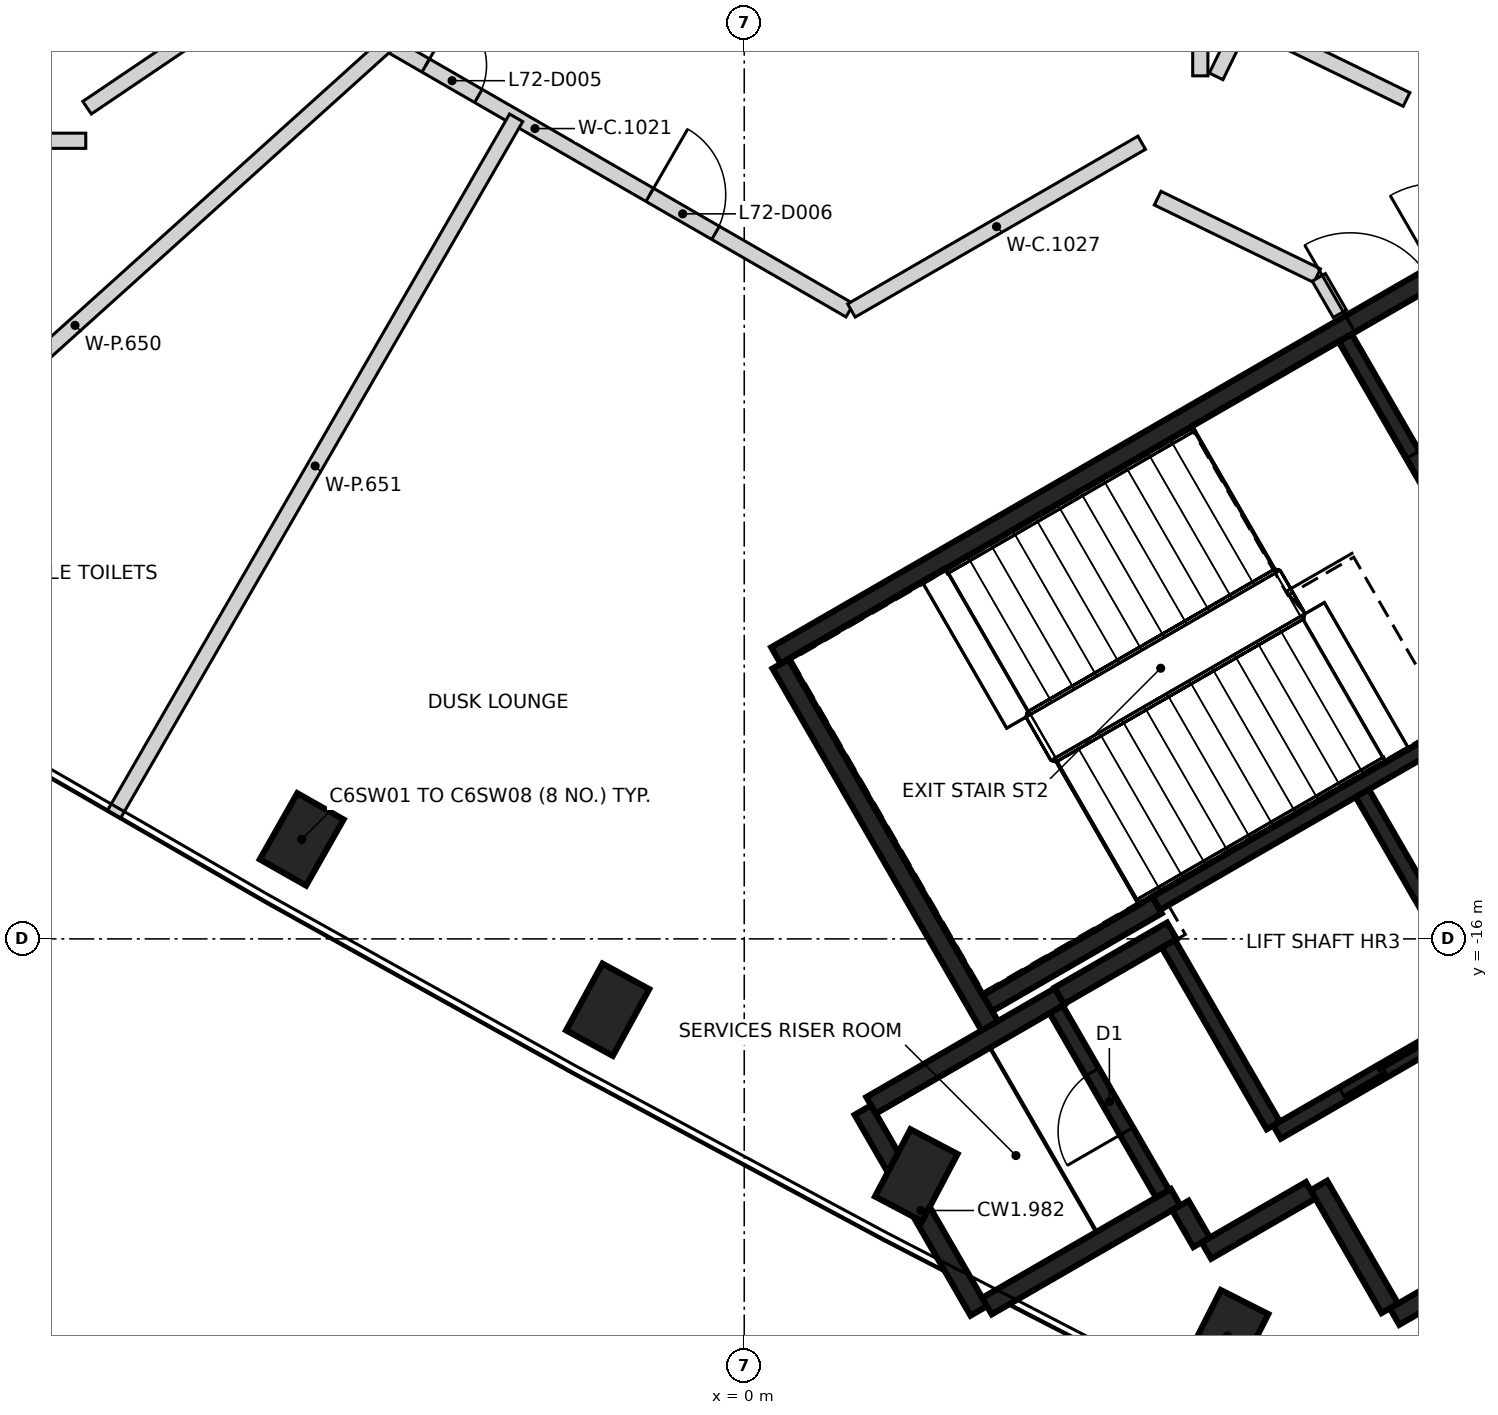
"""IFC4 building model, lengths in metres.
Left out: names, types, materials, properties, quantities, classifications, styles, units other than length and angle.
Written with IfcOpenShell. Run it as: python <this file> out.ifc"""

import sys

from ifc_helpers import new_model, si_unit, direction, frame, frame_2d, origin, origin_2d, place, context, subcontext, project, spatial, rectangle, extrude, element, fill, save


model = new_model("IFC4")
c1 = context("Model", 3, precision=1e-05, world=origin(), true_north=direction((0.0, 1.0)))
c2 = subcontext(c1, "Body", "Model", "MODEL_VIEW")
j1 = project(units=[si_unit("LENGTHUNIT", "METRE"), si_unit("PLANEANGLEUNIT", "RADIAN")], contexts=[c1])
p1 = place(None, origin())
s1 = spatial("IfcSite", under=j1, at=p1, CompositionType="ELEMENT")
p2 = place(p1, origin())
s2 = spatial("IfcBuilding", under=s1, at=p2, CompositionType="ELEMENT")
p3 = place(p2, frame((0.0, 0.0, 283.8)))
s3 = spatial("IfcBuildingStorey", under=s2, at=p3, CompositionType="ELEMENT", Elevation=283.8)
for number, where, z_axis, x_axis in (
    (1, (-5.822, -14.691, -0.35), (0.0, 0.0, 1.0), (0.493, 0.87, 0.0)),
    (2, (-1.797, -16.932, -0.35), (0.0, 0.0, 1.0), (0.479, 0.878, 0.0)),
    (3, (2.263, -19.11, -0.35), (0.0, 0.0, 1.0), (0.466, 0.885, 0.0)),
    (4, (6.356, -21.224, -0.35), (0.0, 0.0, 1.0), (0.452, 0.892, 0.0)),
):
    element("IfcColumn", number, at=place(p3, frame(where, z_axis=z_axis, x_axis=x_axis)), inside=s3, PredefinedType="COLUMN", context=c2, shape_type="SweptSolid", body=[
        extrude(rectangle(XDim=1.0, YDim=0.7, at=origin_2d()), origin(), (0.0, 0.0, 1.0), 7.2),
    ])
p4 = place(p3, frame((0.417, -12.273, 0.0), z_axis=(0.0, 0.0, 1.0), x_axis=(0.866021906294, 0.500006057782, 0.0)))
e5 = element("IfcWall", 5, at=p4, inside=s3, PredefinedType="SHEAR", context=c2, shape_type="SweptSolid", body=[
    extrude(rectangle(XDim=11.55, YDim=0.25, at=frame_2d((5.775, 0.0))), origin(), (0.0, 0.0, 1.0), 6.85),
])
p5 = place(p4, frame((10.025, 0.0, 0.0)))
e6 = element("IfcOpeningElement", 6, at=p5, cuts=e5, PredefinedType="OPENING", context=c2, shape_type="SweptSolid", body=[
    extrude(rectangle(XDim=1.2, YDim=2.1, at=frame_2d((0.6, 1.05))), frame((0.0, 0.135, 0.0), z_axis=(0.0, -1.0, 0.0), x_axis=(1.0, 0.0, 0.0)), (0.0, 0.0, 1.0), 0.27),
])
p6 = place(p4, frame((8.725, 0.0, 0.0)))
e7 = element("IfcOpeningElement", 7, at=p6, cuts=e5, PredefinedType="OPENING", context=c2, shape_type="SweptSolid", body=[
    extrude(rectangle(XDim=1.2, YDim=2.1, at=frame_2d((0.6, 1.05))), frame((0.0, 0.135, 0.0), z_axis=(0.0, -1.0, 0.0), x_axis=(1.0, 0.0, 0.0)), (0.0, 0.0, 1.0), 0.27),
])
p7 = place(p3, frame((16.133, -16.594, 0.0), z_axis=(0.0, 0.0, 1.0), x_axis=(-0.866022959057, -0.500004234368, 0.0)))
e8 = element("IfcWall", 8, at=p7, inside=s3, PredefinedType="SHEAR", context=c2, shape_type="SweptSolid", body=[
    extrude(rectangle(XDim=8.75, YDim=0.25, at=frame_2d((4.375, 0.0))), origin(), (0.0, 0.0, 1.0), 6.85),
])
p8 = place(p7, frame((3.425, 0.0, 0.0)))
e9 = element("IfcOpeningElement", 9, at=p8, cuts=e8, PredefinedType="OPENING", context=c2, shape_type="SweptSolid", body=[
    extrude(rectangle(XDim=0.9, YDim=2.1, at=frame_2d((0.45, 1.05))), frame((0.0, 0.135, 0.0), z_axis=(0.0, -1.0, 0.0), x_axis=(1.0, 0.0, 0.0)), (0.0, 0.0, 1.0), 0.27),
])
p9 = place(p3, frame((3.235, -17.153, 0.0), z_axis=(0.0, 0.0, 1.0), x_axis=(-0.500008851346, 0.866020293397, 0.0)))
e10 = element("IfcWall", 10, at=p9, inside=s3, PredefinedType="SHEAR", context=c2, shape_type="SweptSolid", body=[
    extrude(rectangle(XDim=5.51, YDim=0.25, at=frame_2d((2.755, 0.0))), origin(), (0.0, 0.0, 1.0), 6.85),
])
p10 = place(p3, frame((3.085, -20.894, 0.0), z_axis=(0.0, 0.0, 1.0), x_axis=(-0.499978833458, 0.866037623948, 0.0)))
e11 = element("IfcWall", 11, at=p10, inside=s3, PredefinedType="SHEAR", context=c2, shape_type="SweptSolid", body=[
    extrude(rectangle(XDim=3.05, YDim=0.25, at=frame_2d((1.525, 0.0))), origin(), (0.0, 0.0, 1.0), 6.85),
])
p11 = place(p3, frame((1.669, -18.19, 0.0), z_axis=(0.0, 0.0, 1.0), x_axis=(0.866042235819, 0.499970844928, 0.0)))
e12 = element("IfcWall", 12, at=p11, inside=s3, PredefinedType="SHEAR", context=c2, shape_type="SweptSolid", body=[
    extrude(rectangle(XDim=2.865, YDim=0.25, at=frame_2d((1.432, 0.0))), origin(), (0.0, 0.0, 1.0), 6.85),
])
p12 = place(p3, frame((5.675, -19.399, 0.0), z_axis=(0.0, 0.0, 1.0), x_axis=(-0.866026637627, -0.499997862916, 0.0)))
e13 = element("IfcWall", 13, at=p12, inside=s3, PredefinedType="SHEAR", context=c2, shape_type="SweptSolid", body=[
    extrude(rectangle(XDim=2.865, YDim=0.25, at=frame_2d((1.432, 0.0))), origin(), (0.0, 0.0, 1.0), 6.85),
])
p13 = place(p3, frame((5.431, -15.556, 0.0), z_axis=(0.0, 0.0, 1.0), x_axis=(-0.866022940537, -0.500004266446, 0.0)))
e14 = element("IfcWall", 14, at=p13, inside=s3, PredefinedType="SHEAR", context=c2, shape_type="SweptSolid", body=[
    extrude(rectangle(XDim=2.575, YDim=0.25, at=frame_2d((1.287, 0.0))), origin(), (0.0, 0.0, 1.0), 6.85),
])
p14 = place(p3, frame((8.493, -20.86, 0.0), z_axis=(0.0, 0.0, 1.0), x_axis=(-0.500039802285, 0.866002422705, 0.0)))
e15 = element("IfcWall", 15, at=p14, inside=s3, PredefinedType="SHEAR", context=c2, shape_type="SweptSolid", body=[
    extrude(rectangle(XDim=1.865, YDim=0.25, at=frame_2d((0.932, 0.0))), origin(), (0.0, 0.0, 1.0), 6.85),
])
p15 = place(p3, frame((4.145, -16.749, 0.0), z_axis=(0.0, 0.0, 1.0), x_axis=(0.866038183914, 0.499977863513, 0.0)))
e16 = element("IfcWall", 16, at=p15, inside=s3, PredefinedType="SHEAR", context=c2, shape_type="SweptSolid", body=[
    extrude(rectangle(XDim=1.71, YDim=0.25, at=frame_2d((0.855, 0.0))), origin(), (0.0, 0.0, 1.0), 6.85),
])
p16 = place(p3, frame((7.452, -19.308, 0.0), z_axis=(0.0, 0.0, 1.0), x_axis=(-0.866044474677, -0.49996696679, 0.0)))
e17 = element("IfcWall", 17, at=p16, inside=s3, PredefinedType="SHEAR", context=c2, shape_type="SweptSolid", body=[
    extrude(rectangle(XDim=1.584, YDim=0.25, at=frame_2d((0.792, 0.0))), origin(), (0.0, 0.0, 1.0), 6.85),
])
p17 = place(p3, frame((6.017, -19.992, 0.0), z_axis=(0.0, 0.0, 1.0), x_axis=(-0.500364886717, 0.865814633822, 0.0)))
e18 = element("IfcWall", 18, at=p17, inside=s3, PredefinedType="SHEAR", context=c2, shape_type="SweptSolid", body=[
    extrude(rectangle(XDim=0.559, YDim=0.25, at=frame_2d((0.28, 0.0))), origin(), (0.0, 0.0, 1.0), 6.85),
])
p18 = place(p3, frame((5.419, -15.534, 0.0), z_axis=(0.0, 0.0, 1.0), x_axis=(0.866029065029, 0.499993658486, 0.0)))
e19 = element("IfcWall", 19, at=p18, inside=s3, PredefinedType="SHEAR", context=c2, shape_type="SweptSolid", body=[
    extrude(rectangle(XDim=5.974, YDim=0.2, at=frame_2d((2.987, 0.0))), origin(), (0.0, 0.0, 1.0), 6.85),
])
p19 = place(p3, frame((7.01, -18.542, 0.0), z_axis=(0.0, 0.0, 1.0), x_axis=(0.866030299012, 0.499991521122, 0.0)))
e20 = element("IfcWall", 20, at=p19, inside=s3, PredefinedType="SHEAR", context=c2, shape_type="SweptSolid", body=[
    extrude(rectangle(XDim=6.1, YDim=0.2, at=frame_2d((3.05, 0.0))), origin(), (0.0, 0.0, 1.0), 6.85),
])
p20 = place(p19, frame((1.0, 0.0, 0.0)))
e21 = element("IfcOpeningElement", 21, at=p20, cuts=e20, PredefinedType="OPENING", context=c2, shape_type="SweptSolid", body=[
    extrude(rectangle(XDim=1.2, YDim=2.1, at=frame_2d((0.6, 1.05))), frame((0.0, 0.11, 0.0), z_axis=(0.0, -1.0, 0.0), x_axis=(1.0, 0.0, 0.0)), (0.0, 0.0, 1.0), 0.22),
])
p21 = place(p19, frame((3.982, 0.0, 0.0)))
e22 = element("IfcOpeningElement", 22, at=p21, cuts=e20, PredefinedType="OPENING", context=c2, shape_type="SweptSolid", body=[
    extrude(rectangle(XDim=1.2, YDim=2.1, at=frame_2d((0.6, 1.05))), frame((0.0, 0.11, 0.0), z_axis=(0.0, -1.0, 0.0), x_axis=(1.0, 0.0, 0.0)), (0.0, 0.0, 1.0), 0.22),
])
p22 = place(p3, frame((7.906, -8.094, 0.0), z_axis=(0.0, 0.0, 1.0), x_axis=(0.500027839223, -0.866009330205, 0.0)))
e23 = element("IfcWall", 23, at=p22, inside=s3, PredefinedType="SHEAR", context=c2, shape_type="SweptSolid", body=[
    extrude(rectangle(XDim=5.098, YDim=0.2, at=frame_2d((2.549, 0.0))), origin(), (0.0, 0.0, 1.0), 6.85),
])
p23 = place(p22, frame((1.774, 0.0, 0.0)))
e24 = element("IfcOpeningElement", 24, at=p23, cuts=e23, PredefinedType="OPENING", context=c2, shape_type="SweptSolid", body=[
    extrude(rectangle(XDim=1.4, YDim=2.1, at=frame_2d((0.7, 1.05))), frame((0.0, 0.11, 0.0), z_axis=(0.0, -1.0, 0.0), x_axis=(1.0, 0.0, 0.0)), (0.0, 0.0, 1.0), 0.22),
])
p24 = place(p3, frame((8.132, -14.084, 0.0), z_axis=(0.0, 0.0, 1.0), x_axis=(0.499997778408, -0.866026686418, 0.0)))
e25 = element("IfcWall", 25, at=p24, inside=s3, PredefinedType="SHEAR", context=c2, shape_type="SweptSolid", body=[
    extrude(rectangle(XDim=3.198, YDim=0.2, at=frame_2d((1.599, 0.0))), origin(), (0.0, 0.0, 1.0), 6.85),
])
p25 = place(p3, frame((5.503, -19.352, 0.0), z_axis=(0.0, 0.0, 1.0), x_axis=(-0.499986818241, 0.866033014143, 0.0)))
e26 = element("IfcWall", 26, at=p25, inside=s3, PredefinedType="SHEAR", context=c2, shape_type="SweptSolid", body=[
    extrude(rectangle(XDim=2.798, YDim=0.2, at=frame_2d((1.399, 0.0))), origin(), (0.0, 0.0, 1.0), 6.85),
])
p26 = place(p25, frame((0.949, 0.0, 0.0)))
e27 = element("IfcOpeningElement", 27, at=p26, cuts=e26, PredefinedType="OPENING", context=c2, shape_type="SweptSolid", body=[
    extrude(rectangle(XDim=0.9, YDim=2.1, at=frame_2d((0.45, 1.05))), frame((0.0, 0.11, 0.0), z_axis=(0.0, -1.0, 0.0), x_axis=(1.0, 0.0, 0.0)), (0.0, 0.0, 1.0), 0.22),
])
p27 = place(p3, frame((6.96, -18.455, 0.0), z_axis=(0.0, 0.0, 1.0), x_axis=(-0.499926705758, 0.866067716099, 0.0)))
e28 = element("IfcWall", 28, at=p27, inside=s3, PredefinedType="SHEAR", context=c2, shape_type="SweptSolid", body=[
    extrude(rectangle(XDim=2.759, YDim=0.2, at=frame_2d((1.38, 0.0))), origin(), (0.0, 0.0, 1.0), 6.85),
])
p28 = place(p3, frame((-10.652, -5.5, 0.0), z_axis=(0.0, 0.0, 1.0), x_axis=(1.0, 0.0, 0.0)))
e29 = element("IfcWall", 29, at=p28, inside=s3, PredefinedType="PARTITIONING", context=c2, shape_type="SweptSolid", body=[
    extrude(rectangle(XDim=1.989, YDim=0.2, at=frame_2d((0.995, 0.0))), origin(), (0.0, 0.0, 1.0), 6.85),
])
p29 = place(p3, frame((-8.646, -5.065, 0.0), z_axis=(0.0, 0.0, 1.0), x_axis=(0.828455481329, 0.560054921821, 0.0)))
e30 = element("IfcWall", 30, at=p29, inside=s3, PredefinedType="PARTITIONING", context=c2, shape_type="SweptSolid", body=[
    extrude(rectangle(XDim=2.362, YDim=0.2, at=frame_2d((1.181, 0.0))), origin(), (0.0, 0.0, 1.0), 6.85),
])
p30 = place(p3, frame((-6.895, -2.948, 0.0), z_axis=(0.0, 0.0, 1.0), x_axis=(0.865991331413, -0.500059010435, 0.0)))
e31 = element("IfcWall", 31, at=p30, inside=s3, PredefinedType="PARTITIONING", context=c2, shape_type="SweptSolid", body=[
    extrude(rectangle(XDim=9.565, YDim=0.2, at=frame_2d((4.783, 0.0))), origin(), (0.0, 0.0, 1.0), 6.85),
])
p31 = place(p30, frame((0.879, 0.0, 0.0)))
e32 = element("IfcOpeningElement", 32, at=p31, cuts=e31, PredefinedType="OPENING", context=c2, shape_type="SweptSolid", body=[
    extrude(rectangle(XDim=0.8, YDim=2.1, at=frame_2d((0.4, 1.05))), frame((0.0, 0.11, 0.0), z_axis=(0.0, -1.0, 0.0), x_axis=(1.0, 0.0, 0.0)), (0.0, 0.0, 1.0), 0.22),
])
p32 = place(p30, frame((3.123, 0.0, 0.0)))
e33 = element("IfcOpeningElement", 33, at=p32, cuts=e31, PredefinedType="OPENING", context=c2, shape_type="SweptSolid", body=[
    extrude(rectangle(XDim=0.8, YDim=2.1, at=frame_2d((0.4, 1.05))), frame((0.0, 0.11, 0.0), z_axis=(0.0, -1.0, 0.0), x_axis=(1.0, 0.0, 0.0)), (0.0, 0.0, 1.0), 0.22),
])
p33 = place(p30, frame((6.526, 0.0, 0.0)))
e34 = element("IfcOpeningElement", 34, at=p33, cuts=e31, PredefinedType="OPENING", context=c2, shape_type="SweptSolid", body=[
    extrude(rectangle(XDim=1.0, YDim=2.1, at=frame_2d((0.5, 1.05))), frame((0.0, 0.11, 0.0), z_axis=(0.0, -1.0, 0.0), x_axis=(1.0, 0.0, 0.0)), (0.0, 0.0, 1.0), 0.22),
])
p34 = place(p3, frame((1.41, -7.733, 0.0), z_axis=(0.0, 0.0, 1.0), x_axis=(0.865821381066, 0.50035321133, 0.0)))
e35 = element("IfcWall", 35, at=p34, inside=s3, PredefinedType="PARTITIONING", context=c2, shape_type="SweptSolid", body=[
    extrude(rectangle(XDim=4.411, YDim=0.2, at=frame_2d((2.206, 0.0))), origin(), (0.0, 0.0, 1.0), 6.85),
])
p35 = place(p3, frame((5.439, -6.255, 0.0), z_axis=(0.0, 0.0, 1.0), x_axis=(0.899432970097, -0.437058728665, 0.0)))
e36 = element("IfcWall", 36, at=p35, inside=s3, PredefinedType="PARTITIONING", context=c2, shape_type="SweptSolid", body=[
    extrude(rectangle(XDim=2.334, YDim=0.2, at=frame_2d((1.167, 0.0))), origin(), (0.0, 0.0, 1.0), 6.85),
])
p36 = place(p3, frame((6.0, -4.646, 0.0), z_axis=(0.0, 0.0, 1.0), x_axis=(0.0, 1.0, 0.0)))
e37 = element("IfcWall", 37, at=p36, inside=s3, PredefinedType="PARTITIONING", context=c2, shape_type="SweptSolid", body=[
    extrude(rectangle(XDim=9.129, YDim=0.2, at=frame_2d((4.564, 0.0))), origin(), (0.0, 0.0, 1.0), 6.85),
])
p37 = place(p36, frame((4.064, 0.0, 0.0)))
e38 = element("IfcOpeningElement", 38, at=p37, cuts=e37, PredefinedType="OPENING", context=c2, shape_type="SweptSolid", body=[
    extrude(rectangle(XDim=1.0, YDim=2.1, at=frame_2d((0.5, 1.05))), frame((0.0, 0.11, 0.0), z_axis=(0.0, -1.0, 0.0), x_axis=(1.0, 0.0, 0.0)), (0.0, 0.0, 1.0), 0.22),
])
p38 = place(p3, frame((6.208, -4.653, 0.0), z_axis=(0.0, 0.0, 1.0), x_axis=(0.437794708486, 0.899074965296, 0.0)))
e39 = element("IfcWall", 39, at=p38, inside=s3, PredefinedType="PARTITIONING", context=c2, shape_type="SweptSolid", body=[
    extrude(rectangle(XDim=0.811, YDim=0.2, at=frame_2d((0.405, 0.0))), origin(), (0.0, 0.0, 1.0), 6.85),
])
p39 = place(p3, frame((6.587, -3.922, 0.0), z_axis=(0.0, 0.0, 1.0), x_axis=(0.899126380137, -0.437689104892, 0.0)))
e40 = element("IfcWall", 40, at=p39, inside=s3, PredefinedType="PARTITIONING", context=c2, shape_type="SweptSolid", body=[
    extrude(rectangle(XDim=2.365, YDim=0.2, at=frame_2d((1.182, 0.0))), origin(), (0.0, 0.0, 1.0), 6.85),
])
p40 = place(p3, frame((7.559, -7.297, 0.0), z_axis=(0.0, 0.0, 1.0), x_axis=(0.500740595022, -0.86559739862, 0.0)))
e41 = element("IfcWall", 41, at=p40, inside=s3, PredefinedType="PARTITIONING", context=c2, shape_type="SweptSolid", body=[
    extrude(rectangle(XDim=0.553, YDim=0.2, at=frame_2d((0.277, 0.0))), origin(), (0.0, 0.0, 1.0), 6.85),
])
p41 = place(p3, frame((-12.917, -11.631, 0.0), z_axis=(0.0, 0.0, 1.0), x_axis=(0.743160324176, 0.669113392909, 0.0)))
e42 = element("IfcWall", 42, at=p41, inside=s3, PredefinedType="PARTITIONING", context=c2, shape_type="SweptSolid", body=[
    extrude(rectangle(XDim=11.068, YDim=0.2, at=frame_2d((5.534, 0.0))), origin(), (0.0, 0.0, 1.0), 5.95),
])
p42 = place(p3, frame((-8.289, -14.358, 0.0), z_axis=(0.0, 0.0, 1.0), x_axis=(0.499979535923, 0.866037218403, 0.0)))
e43 = element("IfcWall", 43, at=p42, inside=s3, PredefinedType="PARTITIONING", context=c2, shape_type="SweptSolid", body=[
    extrude(rectangle(XDim=10.577, YDim=0.2, at=frame_2d((5.289, 0.0))), origin(), (0.0, 0.0, 1.0), 5.95),
])
p43 = place(p20, origin())
e44 = element("IfcDoor", 44, at=p43, inside=s3, OperationType="DOUBLE_DOOR_SLIDING", PredefinedType="DOOR", context=c2, shape_type="SweptSolid", body=[
    extrude(rectangle(XDim=1.2, YDim=2.1, at=frame_2d((0.6, 1.05))), frame((0.0, 0.025, 0.0), z_axis=(0.0, -1.0, 0.0), x_axis=(1.0, 0.0, 0.0)), (0.0, 0.0, 1.0), 0.05),
])
fill(e21, e44)
p44 = place(p6, origin())
e45 = element("IfcDoor", 45, at=p44, inside=s3, OperationType="SINGLE_SWING_RIGHT", PredefinedType="DOOR", context=c2, shape_type="SweptSolid", body=[
    extrude(rectangle(XDim=1.2, YDim=2.1, at=frame_2d((0.6, 1.05))), frame((0.0, 0.025, 0.0), z_axis=(0.0, -1.0, 0.0), x_axis=(1.0, 0.0, 0.0)), (0.0, 0.0, 1.0), 0.05),
])
fill(e7, e45)
p45 = place(p23, origin())
e46 = element("IfcDoor", 46, at=p45, inside=s3, OperationType="SINGLE_SWING_RIGHT", PredefinedType="DOOR", context=c2, shape_type="SweptSolid", body=[
    extrude(rectangle(XDim=1.4, YDim=2.1, at=frame_2d((0.7, 1.05))), frame((0.0, 0.025, 0.0), z_axis=(0.0, -1.0, 0.0), x_axis=(1.0, 0.0, 0.0)), (0.0, 0.0, 1.0), 0.05),
])
fill(e24, e46)
p46 = place(p26, origin())
e47 = element("IfcDoor", 47, at=p46, inside=s3, OperationType="SINGLE_SWING_LEFT", PredefinedType="DOOR", context=c2, shape_type="SweptSolid", body=[
    extrude(rectangle(XDim=0.9, YDim=2.1, at=frame_2d((0.45, 1.05))), frame((0.0, 0.025, 0.0), z_axis=(0.0, -1.0, 0.0), x_axis=(1.0, 0.0, 0.0)), (0.0, 0.0, 1.0), 0.05),
])
fill(e27, e47)
p47 = place(p32, frame((0.8, 0.0, 0.0), z_axis=(0.0, 0.0, 1.0), x_axis=(-1.0, 0.0, 0.0)))
e48 = element("IfcDoor", 48, at=p47, inside=s3, OperationType="SINGLE_SWING_LEFT", PredefinedType="DOOR", context=c2, shape_type="SweptSolid", body=[
    extrude(rectangle(XDim=0.8, YDim=2.1, at=frame_2d((0.4, 1.05))), frame((0.0, 0.025, 0.0), z_axis=(0.0, -1.0, 0.0), x_axis=(1.0, 0.0, 0.0)), (0.0, 0.0, 1.0), 0.05),
])
fill(e33, e48)
p48 = place(p33, frame((1.0, 0.0, 0.0), z_axis=(0.0, 0.0, 1.0), x_axis=(-1.0, 0.0, 0.0)))
e49 = element("IfcDoor", 49, at=p48, inside=s3, OperationType="SINGLE_SWING_LEFT", PredefinedType="DOOR", context=c2, shape_type="SweptSolid", body=[
    extrude(rectangle(XDim=1.0, YDim=2.1, at=frame_2d((0.5, 1.05))), frame((0.0, 0.025, 0.0), z_axis=(0.0, -1.0, 0.0), x_axis=(1.0, 0.0, 0.0)), (0.0, 0.0, 1.0), 0.05),
])
fill(e34, e49)
save(model, sys.argv[1])
